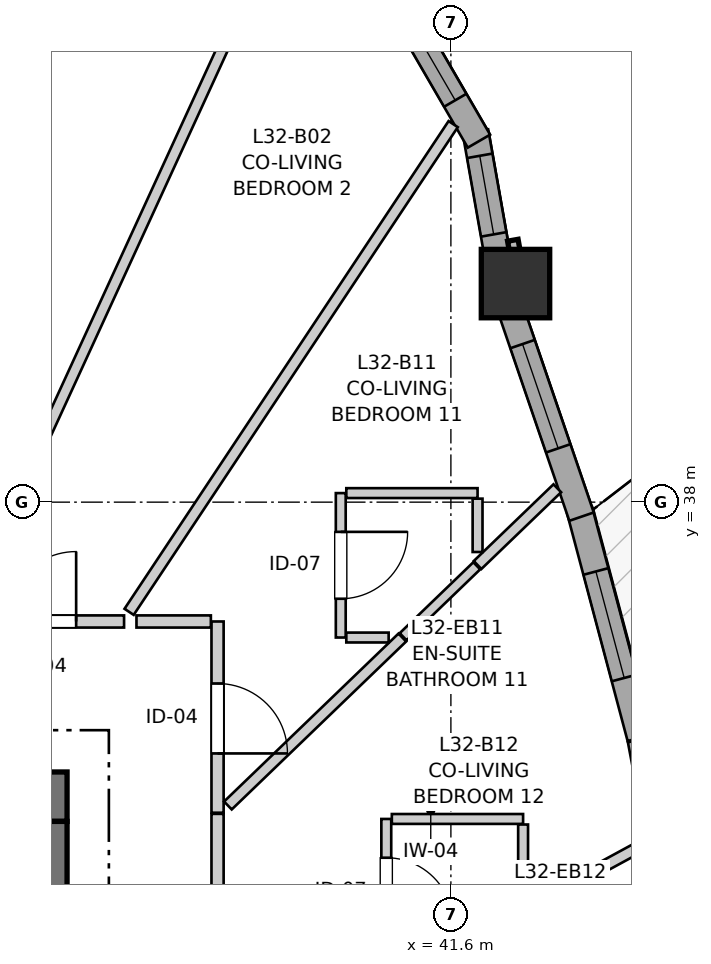
"""IFC4 building model, lengths in metres.
Left out: names, types, materials, properties, quantities, classifications, styles, units other than length and angle.
Written with IfcOpenShell. Run it as: python <this file> out.ifc"""

import sys

from ifc_helpers import new_model, si_unit, direction, frame, frame_2d, origin, origin_2d, place, context, subcontext, project, spatial, rectangle, extrude, source, transform, mapped, element, fill, save


model = new_model("IFC4")
c1 = context("Model", 3, precision=1e-05, world=origin(), true_north=direction((0.0, 1.0)))
c2 = subcontext(c1, "Body", "Model", "MODEL_VIEW")
j1 = project(units=[si_unit("LENGTHUNIT", "METRE"), si_unit("PLANEANGLEUNIT", "RADIAN")], contexts=[c1])
p1 = place(None, origin())
s1 = spatial("IfcSite", under=j1, at=p1, CompositionType="ELEMENT")
p2 = place(p1, origin())
s2 = spatial("IfcBuilding", under=s1, at=p2, CompositionType="ELEMENT")
p3 = place(p2, frame((0.0, 0.0, 108.8)))
s3 = spatial("IfcBuildingStorey", under=s2, at=p3, CompositionType="ELEMENT", Elevation=108.8)
p4 = place(p3, frame((36.55, 34.125, 0.0), z_axis=(0.0, 0.0, 1.0), x_axis=(-1.0, 0.0, 0.0)))
e1 = element("IfcWall", 1, at=p4, inside=s3, PredefinedType="SHEAR", context=c2, shape_type="SweptSolid", body=[
    extrude(rectangle(XDim=12.4, YDim=0.65, at=frame_2d((6.2, 0.0))), origin(), (0.0, 0.0, 1.0), 2.935),
])
p5 = place(p3, frame((36.225, 18.2, 0.0), z_axis=(0.0, 0.0, 1.0), x_axis=(0.0, 1.0, 0.0)))
e2 = element("IfcWall", 2, at=p5, inside=s3, PredefinedType="SHEAR", context=c2, shape_type="SweptSolid", body=[
    extrude(rectangle(XDim=15.6, YDim=0.65, at=frame_2d((7.8, 0.0))), origin(), (0.0, 0.0, 1.0), 2.935),
])
p6 = place(p5, frame((4.25, 0.0, 0.0)))
e3 = element("IfcOpeningElement", 3, at=p6, cuts=e2, PredefinedType="OPENING", context=c2, shape_type="SweptSolid", body=[
    extrude(rectangle(XDim=1.1, YDim=2.15, at=frame_2d((0.55, 1.075))), frame((0.0, 0.335, 0.0), z_axis=(0.0, -1.0, 0.0), x_axis=(1.0, 0.0, 0.0)), (0.0, 0.0, 1.0), 0.67),
])
p7 = place(p5, frame((10.25, 0.0, 0.0)))
e4 = element("IfcOpeningElement", 4, at=p7, cuts=e2, PredefinedType="OPENING", context=c2, shape_type="SweptSolid", body=[
    extrude(rectangle(XDim=1.1, YDim=2.15, at=frame_2d((0.55, 1.075))), frame((0.0, 0.335, 0.0), z_axis=(0.0, -1.0, 0.0), x_axis=(1.0, 0.0, 0.0)), (0.0, 0.0, 1.0), 0.67),
])
m1 = source(origin(), c2, "Body", "SweptSolid", [
    extrude(rectangle(XDim=0.9, YDim=0.9, at=origin_2d()), origin(), (0.0, 0.0, 1.0), 2.935),
])
p8 = place(p3, frame((42.45, 40.875, 0.0), z_axis=(0.0, 0.0, 1.0), x_axis=(1.0, 0.0, 0.0)))
e5 = element("IfcColumn", 5, at=p8, inside=s3, PredefinedType="COLUMN", context=c2, shape_type="MappedRepresentation", body=[
    mapped(m1, transform((0.0, 0.0, 0.0), x_axis=(1.0, 0.0, 0.0), y_axis=(0.0, 1.0, 0.0), z_axis=(0.0, 0.0, 1.0), scale=1.0)),
])
p9 = place(p3, frame((44.664, 31.881, 0.0), z_axis=(0.0, 0.0, 1.0), x_axis=(-0.18665909876, 0.982424745642, 0.0)))
e6 = element("IfcWall", 6, at=p9, inside=s3, PredefinedType="SOLIDWALL", context=c2, shape_type="SweptSolid", body=[
    extrude(rectangle(XDim=3.046, YDim=0.34, at=frame_2d((1.523, 0.0))), origin(), (0.0, 0.0, 1.0), 2.465),
])
p10 = place(p9, frame((0.416, 0.0, 0.82)))
e7 = element("IfcOpeningElement", 7, at=p10, cuts=e6, PredefinedType="OPENING", context=c2, shape_type="SweptSolid", body=[
    extrude(rectangle(XDim=0.95, YDim=1.35, at=frame_2d((0.475, 0.675))), frame((0.0, 0.18, 0.0), z_axis=(0.0, -1.0, 0.0), x_axis=(1.0, 0.0, 0.0)), (0.0, 0.0, 1.0), 0.36),
])
p11 = place(p9, frame((2.054, 0.0, 0.82)))
e8 = element("IfcOpeningElement", 8, at=p11, cuts=e6, PredefinedType="OPENING", context=c2, shape_type="SweptSolid", body=[
    extrude(rectangle(XDim=0.58, YDim=1.35, at=frame_2d((0.29, 0.675))), frame((0.0, 0.18, 0.0), z_axis=(0.0, -1.0, 0.0), x_axis=(1.0, 0.0, 0.0)), (0.0, 0.0, 1.0), 0.36),
])
p12 = place(p3, frame((44.09, 34.901, 0.0), z_axis=(0.0, 0.0, 1.0), x_axis=(-0.257108087637, 0.966382652613, 0.0)))
e9 = element("IfcWall", 9, at=p12, inside=s3, PredefinedType="SOLIDWALL", context=c2, shape_type="SweptSolid", body=[
    extrude(rectangle(XDim=3.096, YDim=0.34, at=frame_2d((1.548, 0.0))), origin(), (0.0, 0.0, 1.0), 2.465),
])
p13 = place(p12, frame((0.813, 0.0, 0.82)))
e10 = element("IfcOpeningElement", 10, at=p13, cuts=e9, PredefinedType="OPENING", context=c2, shape_type="SweptSolid", body=[
    extrude(rectangle(XDim=1.45, YDim=1.25, at=frame_2d((0.725, 0.625))), frame((0.0, 0.18, 0.0), z_axis=(0.0, -1.0, 0.0), x_axis=(1.0, 0.0, 0.0)), (0.0, 0.0, 1.0), 0.36),
])
p14 = place(p3, frame((43.319, 37.809, 0.0), z_axis=(0.0, 0.0, 1.0), x_axis=(-0.323586371726, 0.946198636669, 0.0)))
e11 = element("IfcWall", 11, at=p14, inside=s3, PredefinedType="SOLIDWALL", context=c2, shape_type="SweptSolid", body=[
    extrude(rectangle(XDim=2.952, YDim=0.34, at=frame_2d((1.476, 0.0))), origin(), (0.0, 0.0, 1.0), 2.465),
])
p15 = place(p14, frame((0.949, 0.0, 0.82)))
e12 = element("IfcOpeningElement", 12, at=p15, cuts=e11, PredefinedType="OPENING", context=c2, shape_type="SweptSolid", body=[
    extrude(rectangle(XDim=1.45, YDim=1.25, at=frame_2d((0.725, 0.625))), frame((0.0, 0.18, 0.0), z_axis=(0.0, -1.0, 0.0), x_axis=(1.0, 0.0, 0.0)), (0.0, 0.0, 1.0), 0.36),
])
p16 = place(p3, frame((42.242, 41.072, 0.0), z_axis=(0.0, 0.0, 1.0), x_axis=(-0.17440141227, 0.984674640375, 0.0)))
e13 = element("IfcWall", 13, at=p16, inside=s3, PredefinedType="SOLIDWALL", context=c2, shape_type="SweptSolid", body=[
    extrude(rectangle(XDim=1.831, YDim=0.34, at=frame_2d((0.916, 0.0))), origin(), (0.0, 0.0, 1.0), 2.465),
])
p17 = place(p16, frame((0.457, 0.0, 0.82)))
e14 = element("IfcOpeningElement", 14, at=p17, cuts=e13, PredefinedType="OPENING", context=c2, shape_type="SweptSolid", body=[
    extrude(rectangle(XDim=1.05, YDim=1.45, at=frame_2d((0.525, 0.725))), frame((0.0, 0.18, 0.0), z_axis=(0.0, -1.0, 0.0), x_axis=(1.0, 0.0, 0.0)), (0.0, 0.0, 1.0), 0.36),
])
p18 = place(p3, frame((41.969, 42.749, 0.0), z_axis=(0.0, 0.0, 1.0), x_axis=(-0.501989603552, 0.864873654313, 0.0)))
e15 = element("IfcWall", 15, at=p18, inside=s3, PredefinedType="SOLIDWALL", context=c2, shape_type="SweptSolid", body=[
    extrude(rectangle(XDim=2.099, YDim=0.34, at=frame_2d((1.05, 0.0))), origin(), (0.0, 0.0, 1.0), 2.465),
])
p19 = place(p18, frame((0.622, 0.0, 0.82)))
e16 = element("IfcOpeningElement", 16, at=p19, cuts=e15, PredefinedType="OPENING", context=c2, shape_type="SweptSolid", body=[
    extrude(rectangle(XDim=1.15, YDim=1.2, at=frame_2d((0.575, 0.6))), frame((0.0, 0.18, 0.0), z_axis=(0.0, -1.0, 0.0), x_axis=(1.0, 0.0, 0.0)), (0.0, 0.0, 1.0), 0.36),
])
p20 = place(p3, frame((38.53, 33.899, 0.0), z_axis=(0.0, 0.0, 1.0), x_axis=(0.0, -1.0, 0.0)))
e17 = element("IfcWall", 17, at=p20, inside=s3, PredefinedType="PARTITIONING", context=c2, shape_type="SweptSolid", body=[
    extrude(rectangle(XDim=3.469, YDim=0.16, at=frame_2d((1.734, 0.0))), origin(), (0.0, 0.0, 1.0), 2.935),
])
p21 = place(p20, frame((1.277, 0.0, 0.0)))
e18 = element("IfcOpeningElement", 18, at=p21, cuts=e17, PredefinedType="OPENING", context=c2, shape_type="SweptSolid", body=[
    extrude(rectangle(XDim=0.92, YDim=2.1, at=frame_2d((0.46, 1.05))), frame((0.0, 0.09, 0.0), z_axis=(0.0, -1.0, 0.0), x_axis=(1.0, 0.0, 0.0)), (0.0, 0.0, 1.0), 0.18),
])
p22 = place(p3, frame((38.53, 36.43, 0.0), z_axis=(0.0, 0.0, 1.0), x_axis=(0.0, -1.0, 0.0)))
e19 = element("IfcWall", 19, at=p22, inside=s3, PredefinedType="PARTITIONING", context=c2, shape_type="SweptSolid", body=[
    extrude(rectangle(XDim=2.516, YDim=0.16, at=frame_2d((1.258, 0.0))), origin(), (0.0, 0.0, 1.0), 2.573),
])
p23 = place(p22, frame((0.816, 0.0, 0.0)))
e20 = element("IfcOpeningElement", 20, at=p23, cuts=e19, PredefinedType="OPENING", context=c2, shape_type="SweptSolid", body=[
    extrude(rectangle(XDim=0.92, YDim=2.1, at=frame_2d((0.46, 1.05))), frame((0.0, 0.09, 0.0), z_axis=(0.0, -1.0, 0.0), x_axis=(1.0, 0.0, 0.0)), (0.0, 0.0, 1.0), 0.18),
])
p24 = place(p3, frame((35.121, 36.43, 0.0), z_axis=(0.0, 0.0, 1.0), x_axis=(1.0, 0.0, 0.0)))
e21 = element("IfcWall", 21, at=p24, inside=s3, PredefinedType="PARTITIONING", context=c2, shape_type="SweptSolid", body=[
    extrude(rectangle(XDim=2.179, YDim=0.16, at=frame_2d((1.089, 0.0))), origin(), (0.0, 0.0, 1.0), 2.573),
])
p25 = place(p24, frame((0.628, 0.0, 0.0)))
e22 = element("IfcOpeningElement", 22, at=p25, cuts=e21, PredefinedType="OPENING", context=c2, shape_type="SweptSolid", body=[
    extrude(rectangle(XDim=0.92, YDim=2.1, at=frame_2d((0.46, 1.05))), frame((0.0, 0.09, 0.0), z_axis=(0.0, -1.0, 0.0), x_axis=(1.0, 0.0, 0.0)), (0.0, 0.0, 1.0), 0.18),
])
p26 = place(p3, frame((40.75, 33.832, 0.0), z_axis=(0.0, 0.0, 1.0), x_axis=(0.0, -1.0, 0.0)))
e23 = element("IfcWall", 23, at=p26, inside=s3, PredefinedType="PARTITIONING", context=c2, shape_type="SweptSolid", body=[
    extrude(rectangle(XDim=1.9, YDim=0.13, at=frame_2d((0.95, 0.0))), origin(), (0.0, 0.0, 1.0), 2.935),
])
p27 = place(p26, frame((0.51, 0.0, 0.0)))
e24 = element("IfcOpeningElement", 24, at=p27, cuts=e23, PredefinedType="OPENING", context=c2, shape_type="SweptSolid", body=[
    extrude(rectangle(XDim=0.88, YDim=2.05, at=frame_2d((0.44, 1.025))), frame((0.0, 0.075, 0.0), z_axis=(0.0, -1.0, 0.0), x_axis=(1.0, 0.0, 0.0)), (0.0, 0.0, 1.0), 0.15),
])
p28 = place(p3, frame((40.151, 38.119, 0.0), z_axis=(0.0, 0.0, 1.0), x_axis=(0.0, -1.0, 0.0)))
e25 = element("IfcWall", 25, at=p28, inside=s3, PredefinedType="PARTITIONING", context=c2, shape_type="SweptSolid", body=[
    extrude(rectangle(XDim=1.9, YDim=0.13, at=frame_2d((0.95, 0.0))), origin(), (0.0, 0.0, 1.0), 2.935),
])
p29 = place(p28, frame((0.51, 0.0, 0.0)))
e26 = element("IfcOpeningElement", 26, at=p29, cuts=e25, PredefinedType="OPENING", context=c2, shape_type="SweptSolid", body=[
    extrude(rectangle(XDim=0.88, YDim=2.05, at=frame_2d((0.44, 1.025))), frame((0.0, 0.075, 0.0), z_axis=(0.0, -1.0, 0.0), x_axis=(1.0, 0.0, 0.0)), (0.0, 0.0, 1.0), 0.15),
])
p30 = place(p3, frame((35.191, 36.548, 0.0), z_axis=(0.0, 0.0, 1.0), x_axis=(0.417154036681, 0.908835799075, 0.0)))
e27 = element("IfcWall", 27, at=p30, inside=s3, PredefinedType="PARTITIONING", context=c2, shape_type="SweptSolid", body=[
    extrude(rectangle(XDim=9.949, YDim=0.145, at=frame_2d((4.974, 0.0))), origin(), (0.0, 0.0, 1.0), 2.935),
])
p31 = place(p3, frame((37.366, 36.557, 0.0), z_axis=(0.0, 0.0, 1.0), x_axis=(0.553463679146, 0.832873313215, 0.0)))
e28 = element("IfcWall", 28, at=p31, inside=s3, PredefinedType="PARTITIONING", context=c2, shape_type="SweptSolid", body=[
    extrude(rectangle(XDim=7.704, YDim=0.145, at=frame_2d((3.852, 0.0))), origin(), (0.0, 0.0, 1.0), 2.935),
])
p32 = place(p3, frame((38.666, 34.009, 0.0), z_axis=(0.0, 0.0, 1.0), x_axis=(0.72031454127, 0.693647577402, 0.0)))
e29 = element("IfcWall", 29, at=p32, inside=s3, PredefinedType="PARTITIONING", context=c2, shape_type="SweptSolid", body=[
    extrude(rectangle(XDim=3.186, YDim=0.145, at=frame_2d((1.593, 0.0))), origin(), (0.0, 0.0, 1.0), 2.935),
])
p33 = place(p3, frame((42.535, 32.624, 0.0), z_axis=(0.0, 0.0, 1.0), x_axis=(0.878631690287, 0.477500107669, 0.0)))
e30 = element("IfcWall", 30, at=p33, inside=s3, PredefinedType="PARTITIONING", context=c2, shape_type="SweptSolid", body=[
    extrude(rectangle(XDim=1.861, YDim=0.145, at=frame_2d((0.93, 0.0))), origin(), (0.0, 0.0, 1.0), 2.935),
])
p34 = place(p3, frame((40.224, 38.119, 0.0), z_axis=(0.0, 0.0, 1.0), x_axis=(1.0, 0.0, 0.0)))
e31 = element("IfcWall", 31, at=p34, inside=s3, PredefinedType="PARTITIONING", context=c2, shape_type="SweptSolid", body=[
    extrude(rectangle(XDim=1.727, YDim=0.13, at=frame_2d((0.863, 0.0))), origin(), (0.0, 0.0, 1.0), 2.935),
])
p35 = place(p3, frame((40.823, 33.832, 0.0), z_axis=(0.0, 0.0, 1.0), x_axis=(1.0, 0.0, 0.0)))
e32 = element("IfcWall", 32, at=p35, inside=s3, PredefinedType="PARTITIONING", context=c2, shape_type="SweptSolid", body=[
    extrude(rectangle(XDim=1.727, YDim=0.13, at=frame_2d((0.864, 0.0))), origin(), (0.0, 0.0, 1.0), 2.935),
])
p36 = place(p3, frame((41.951, 37.173, 0.0), z_axis=(0.0, 0.0, 1.0), x_axis=(0.720559112487, 0.693393514111, 0.0)))
e33 = element("IfcWall", 33, at=p36, inside=s3, PredefinedType="PARTITIONING", context=c2, shape_type="SweptSolid", body=[
    extrude(rectangle(XDim=1.456, YDim=0.145, at=frame_2d((0.728, 0.0))), origin(), (0.0, 0.0, 1.0), 2.935),
])
p37 = place(p3, frame((40.972, 36.229, 0.0), z_axis=(0.0, 0.0, 1.0), x_axis=(0.72014550452, 0.693823069896, 0.0)))
e34 = element("IfcWall", 34, at=p37, inside=s3, PredefinedType="PARTITIONING", context=c2, shape_type="SweptSolid", body=[
    extrude(rectangle(XDim=1.345, YDim=0.13, at=frame_2d((0.672, 0.0))), origin(), (0.0, 0.0, 1.0), 2.935),
])
p38 = place(p3, frame((37.463, 36.43, 0.0), z_axis=(0.0, 0.0, 1.0), x_axis=(1.0, 0.0, 0.0)))
e35 = element("IfcWall", 35, at=p38, inside=s3, PredefinedType="PARTITIONING", context=c2, shape_type="SweptSolid", body=[
    extrude(rectangle(XDim=0.979, YDim=0.16, at=frame_2d((0.489, 0.0))), origin(), (0.0, 0.0, 1.0), 2.573),
])
p39 = place(p3, frame((42.55, 32.758, 0.0), z_axis=(0.0, 0.0, 1.0), x_axis=(0.0, 1.0, 0.0)))
e36 = element("IfcWall", 36, at=p39, inside=s3, PredefinedType="PARTITIONING", context=c2, shape_type="SweptSolid", body=[
    extrude(rectangle(XDim=1.001, YDim=0.13, at=frame_2d((0.5, 0.0))), origin(), (0.0, 0.0, 1.0), 2.935),
])
p40 = place(p3, frame((41.951, 37.344, 0.0), z_axis=(0.0, 0.0, 1.0), x_axis=(0.0, 1.0, 0.0)))
e37 = element("IfcWall", 37, at=p40, inside=s3, PredefinedType="PARTITIONING", context=c2, shape_type="SweptSolid", body=[
    extrude(rectangle(XDim=0.702, YDim=0.13, at=frame_2d((0.351, 0.0))), origin(), (0.0, 0.0, 1.0), 2.935),
])
p41 = place(p3, frame((40.224, 36.219, 0.0), z_axis=(0.0, 0.0, 1.0), x_axis=(1.0, 0.0, 0.0)))
e38 = element("IfcWall", 38, at=p41, inside=s3, PredefinedType="PARTITIONING", context=c2, shape_type="SweptSolid", body=[
    extrude(rectangle(XDim=0.557, YDim=0.13, at=frame_2d((0.278, 0.0))), origin(), (0.0, 0.0, 1.0), 2.935),
])
m2 = source(origin(), c2, "Body", "SweptSolid", [
    extrude(rectangle(XDim=1.45, YDim=1.25, at=frame_2d((0.725, 0.625))), frame((0.0, 0.03, 0.0), z_axis=(0.0, -1.0, 0.0), x_axis=(1.0, 0.0, 0.0)), (0.0, 0.0, 1.0), 0.06),
])
p42 = place(p13, origin())
e39 = element("IfcWindow", 39, at=p42, inside=s3, PartitioningType="SINGLE_PANEL", PredefinedType="WINDOW", context=c2, shape_type="MappedRepresentation", body=[
    mapped(m2, transform((0.0, 0.0, 0.0), x_axis=(1.0, 0.0, 0.0), y_axis=(0.0, 1.0, 0.0), z_axis=(0.0, 0.0, 1.0), scale=1.0)),
])
fill(e10, e39)
p43 = place(p15, origin())
e40 = element("IfcWindow", 40, at=p43, inside=s3, PartitioningType="SINGLE_PANEL", PredefinedType="WINDOW", context=c2, shape_type="MappedRepresentation", body=[
    mapped(m2, transform((0.0, 0.0, 0.0), x_axis=(1.0, 0.0, 0.0), y_axis=(0.0, 1.0, 0.0), z_axis=(0.0, 0.0, 1.0), scale=1.0)),
])
fill(e12, e40)
m3 = source(origin(), c2, "Body", "SweptSolid", [
    extrude(rectangle(XDim=1.05, YDim=1.45, at=frame_2d((0.525, 0.725))), frame((0.0, 0.03, 0.0), z_axis=(0.0, -1.0, 0.0), x_axis=(1.0, 0.0, 0.0)), (0.0, 0.0, 1.0), 0.06),
])
p44 = place(p17, origin())
e41 = element("IfcWindow", 41, at=p44, inside=s3, PartitioningType="SINGLE_PANEL", PredefinedType="WINDOW", context=c2, shape_type="MappedRepresentation", body=[
    mapped(m3, transform((0.0, 0.0, 0.0), x_axis=(1.0, 0.0, 0.0), y_axis=(0.0, 1.0, 0.0), z_axis=(0.0, 0.0, 1.0), scale=1.0)),
])
fill(e14, e41)
m4 = source(origin(), c2, "Body", "SweptSolid", [
    extrude(rectangle(XDim=1.15, YDim=1.2, at=frame_2d((0.575, 0.6))), frame((0.0, 0.03, 0.0), z_axis=(0.0, -1.0, 0.0), x_axis=(1.0, 0.0, 0.0)), (0.0, 0.0, 1.0), 0.06),
])
p45 = place(p19, origin())
e42 = element("IfcWindow", 42, at=p45, inside=s3, PartitioningType="SINGLE_PANEL", PredefinedType="WINDOW", context=c2, shape_type="MappedRepresentation", body=[
    mapped(m4, transform((0.0, 0.0, 0.0), x_axis=(1.0, 0.0, 0.0), y_axis=(0.0, 1.0, 0.0), z_axis=(0.0, 0.0, 1.0), scale=1.0)),
])
fill(e16, e42)
m5 = source(origin(), c2, "Body", "SweptSolid", [
    extrude(rectangle(XDim=0.92, YDim=2.1, at=frame_2d((0.46, 1.05))), frame((0.0, 0.025, 0.0), z_axis=(0.0, -1.0, 0.0), x_axis=(1.0, 0.0, 0.0)), (0.0, 0.0, 1.0), 0.05),
])
p46 = place(p23, origin())
e43 = element("IfcDoor", 43, at=p46, inside=s3, OperationType="SINGLE_SWING_RIGHT", PredefinedType="DOOR", context=c2, shape_type="MappedRepresentation", body=[
    mapped(m5, transform((0.0, 0.0, 0.0), x_axis=(1.0, 0.0, 0.0), y_axis=(0.0, 1.0, 0.0), z_axis=(0.0, 0.0, 1.0), scale=1.0)),
])
fill(e20, e43)
p47 = place(p25, origin())
e44 = element("IfcDoor", 44, at=p47, inside=s3, OperationType="SINGLE_SWING_RIGHT", PredefinedType="DOOR", context=c2, shape_type="MappedRepresentation", body=[
    mapped(m5, transform((0.0, 0.0, 0.0), x_axis=(1.0, 0.0, 0.0), y_axis=(0.0, 1.0, 0.0), z_axis=(0.0, 0.0, 1.0), scale=1.0)),
])
fill(e22, e44)
m6 = source(origin(), c2, "Body", "SweptSolid", [
    extrude(rectangle(XDim=0.88, YDim=2.05, at=frame_2d((0.44, 1.025))), frame((0.0, 0.025, 0.0), z_axis=(0.0, -1.0, 0.0), x_axis=(1.0, 0.0, 0.0)), (0.0, 0.0, 1.0), 0.05),
])
p48 = place(p27, origin())
e45 = element("IfcDoor", 45, at=p48, inside=s3, OperationType="SINGLE_SWING_RIGHT", PredefinedType="DOOR", context=c2, shape_type="MappedRepresentation", body=[
    mapped(m6, transform((0.0, 0.0, 0.0), x_axis=(1.0, 0.0, 0.0), y_axis=(0.0, 1.0, 0.0), z_axis=(0.0, 0.0, 1.0), scale=1.0)),
])
fill(e24, e45)
p49 = place(p29, origin())
e46 = element("IfcDoor", 46, at=p49, inside=s3, OperationType="SINGLE_SWING_LEFT", PredefinedType="DOOR", context=c2, shape_type="MappedRepresentation", body=[
    mapped(m6, transform((0.0, 0.0, 0.0), x_axis=(1.0, 0.0, 0.0), y_axis=(0.0, 1.0, 0.0), z_axis=(0.0, 0.0, 1.0), scale=1.0)),
])
fill(e26, e46)
save(model, sys.argv[1])
